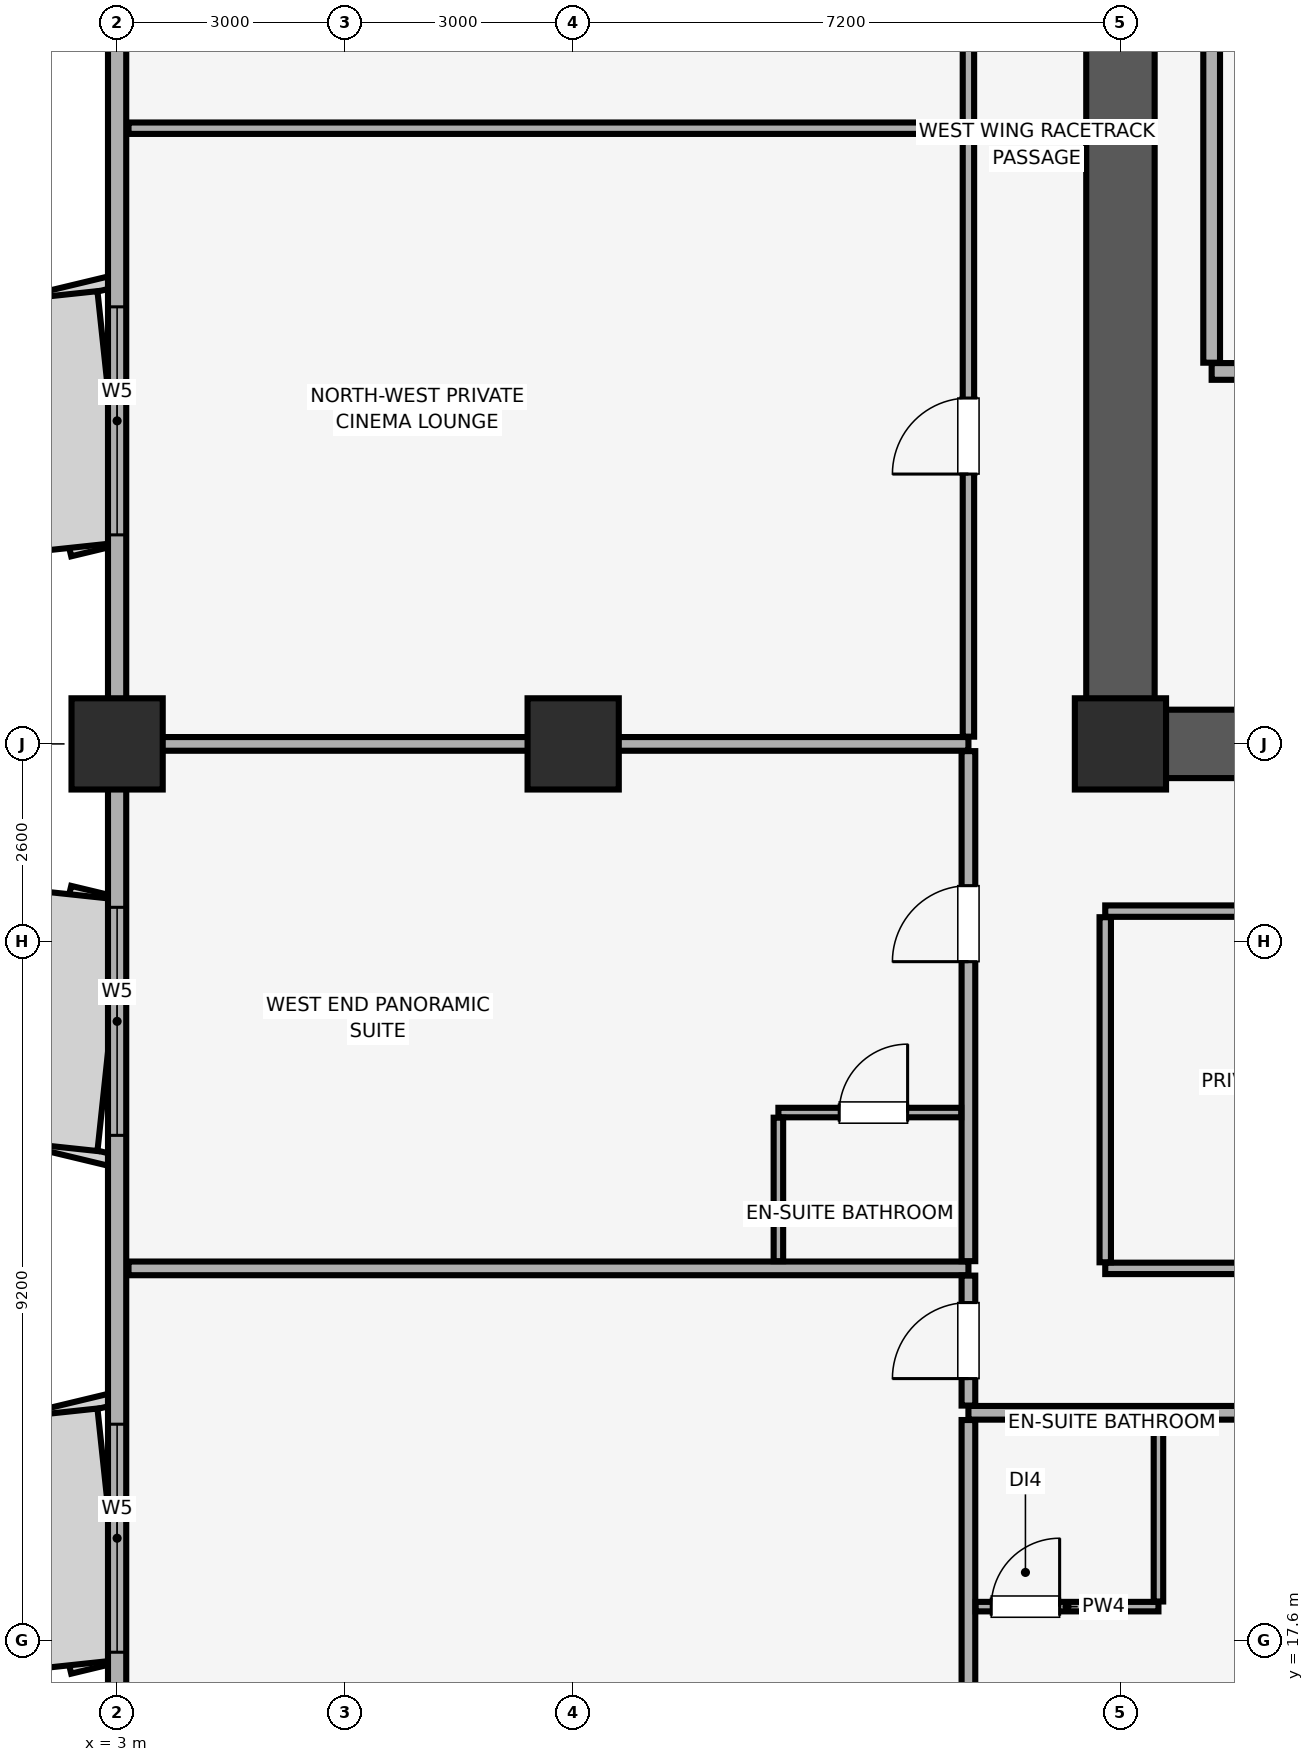
"""IFC4 building model, lengths in metres.
Left out: names, types, materials, properties, quantities, classifications, styles, units other than length and angle.
Written with IfcOpenShell. Run it as: python <this file> out.ifc"""

import sys

from ifc_helpers import new_model, si_unit, direction, frame, frame_2d, origin, origin_2d, place, context, subcontext, project, spatial, rectangle, extrude, element, fill, save


model = new_model("IFC4")
c1 = context("Model", 3, precision=1e-05, world=origin(), true_north=direction((0.0, 1.0)))
c2 = subcontext(c1, "Body", "Model", "MODEL_VIEW")
j1 = project(units=[si_unit("LENGTHUNIT", "METRE"), si_unit("PLANEANGLEUNIT", "RADIAN")], contexts=[c1])
p1 = place(None, origin())
s1 = spatial("IfcSite", under=j1, at=p1, CompositionType="ELEMENT")
p2 = place(p1, origin())
s2 = spatial("IfcBuilding", under=s1, at=p2, CompositionType="ELEMENT")
p3 = place(p2, frame((0.0, 0.0, 180.95)))
s3 = spatial("IfcBuildingStorey", under=s2, at=p3, CompositionType="ELEMENT", Elevation=180.95)
for number, where, z_axis, x_axis in (
    (1, (3.0, 29.4, 0.0), (0.0, 0.0, 1.0), (1.0, 0.0, 0.0)),
    (2, (9.0, 29.4, 0.0), (0.0, 0.0, 1.0), (1.0, 0.0, 0.0)),
    (3, (16.2, 29.4, 0.0), (0.0, 0.0, 1.0), (1.0, 0.0, 0.0)),
):
    element("IfcColumn", number, at=place(p3, frame(where, z_axis=z_axis, x_axis=x_axis)), inside=s3, PredefinedType="COLUMN", context=c2, shape_type="SweptSolid", body=[
        extrude(rectangle(XDim=1.2, YDim=1.2, at=origin_2d()), origin(), (0.0, 0.0, 1.0), 3.45),
    ])
p4 = place(p3, frame((3.0, 45.0, 0.0), z_axis=(0.0, 0.0, 1.0), x_axis=(0.0, -1.0, 0.0)))
e4 = element("IfcWall", 4, at=p4, inside=s3, PredefinedType="SOLIDWALL", context=c2, shape_type="SweptSolid", body=[
    extrude(rectangle(XDim=38.0, YDim=0.24, at=frame_2d((19.0, 0.0))), origin(), (0.0, 0.0, 1.0), 2.65),
])
p5 = place(p4, frame((32.5, 0.0, 0.85)))
e5 = element("IfcOpeningElement", 5, at=p5, cuts=e4, PredefinedType="OPENING", context=c2, shape_type="SweptSolid", body=[
    extrude(rectangle(XDim=3.0, YDim=1.5, at=frame_2d((1.5, 0.75))), frame((0.0, 0.13, 0.0), z_axis=(0.0, -1.0, 0.0), x_axis=(1.0, 0.0, 0.0)), (0.0, 0.0, 1.0), 0.26),
])
p6 = place(p4, frame((24.55, 0.0, 0.85)))
e6 = element("IfcOpeningElement", 6, at=p6, cuts=e4, PredefinedType="OPENING", context=c2, shape_type="SweptSolid", body=[
    extrude(rectangle(XDim=3.0, YDim=1.5, at=frame_2d((1.5, 0.75))), frame((0.0, 0.13, 0.0), z_axis=(0.0, -1.0, 0.0), x_axis=(1.0, 0.0, 0.0)), (0.0, 0.0, 1.0), 0.26),
])
p7 = place(p4, frame((17.75, 0.0, 0.85)))
e7 = element("IfcOpeningElement", 7, at=p7, cuts=e4, PredefinedType="OPENING", context=c2, shape_type="SweptSolid", body=[
    extrude(rectangle(XDim=3.0, YDim=1.5, at=frame_2d((1.5, 0.75))), frame((0.0, 0.13, 0.0), z_axis=(0.0, -1.0, 0.0), x_axis=(1.0, 0.0, 0.0)), (0.0, 0.0, 1.0), 0.26),
])
p8 = place(p4, frame((9.85, 0.0, 0.85)))
e8 = element("IfcOpeningElement", 8, at=p8, cuts=e4, PredefinedType="OPENING", context=c2, shape_type="SweptSolid", body=[
    extrude(rectangle(XDim=3.0, YDim=1.5, at=frame_2d((1.5, 0.75))), frame((0.0, 0.13, 0.0), z_axis=(0.0, -1.0, 0.0), x_axis=(1.0, 0.0, 0.0)), (0.0, 0.0, 1.0), 0.26),
])
p9 = place(p4, frame((1.085, 0.0, 0.85)))
e9 = element("IfcOpeningElement", 9, at=p9, cuts=e4, PredefinedType="OPENING", context=c2, shape_type="SweptSolid", body=[
    extrude(rectangle(XDim=3.0, YDim=1.5, at=frame_2d((1.5, 0.75))), frame((0.0, 0.13, 0.0), z_axis=(0.0, -1.0, 0.0), x_axis=(1.0, 0.0, 0.0)), (0.0, 0.0, 1.0), 0.26),
])
p10 = place(p3, frame((16.2, 29.4, 0.0), z_axis=(0.0, 0.0, 1.0), x_axis=(0.0, 1.0, 0.0)))
e10 = element("IfcWall", 10, at=p10, inside=s3, PredefinedType="SHEAR", context=c2, shape_type="SweptSolid", body=[
    extrude(rectangle(XDim=19.2, YDim=0.9, at=frame_2d((9.6, 0.0))), origin(), (0.0, 0.0, 1.0), 3.45),
])
p11 = place(p3, frame((16.655, 29.4, 0.0), z_axis=(0.0, 0.0, 1.0), x_axis=(1.0, 0.0, 0.0)))
e11 = element("IfcWall", 11, at=p11, inside=s3, PredefinedType="SHEAR", context=c2, shape_type="SweptSolid", body=[
    extrude(rectangle(XDim=6.945, YDim=0.9, at=frame_2d((3.473, 0.0))), origin(), (0.0, 0.0, 1.0), 3.45),
])
p12 = place(p3, frame((17.4, 34.3, 0.0), z_axis=(0.0, 0.0, 1.0), x_axis=(1.0, 0.0, 0.0)))
e12 = element("IfcWall", 12, at=p12, inside=s3, PredefinedType="PARTITIONING", context=c2, shape_type="SweptSolid", body=[
    extrude(rectangle(XDim=6.05, YDim=0.22, at=frame_2d((3.025, 0.0))), origin(), (0.0, 0.0, 1.0), 3.45),
])
p13 = place(p12, frame((2.2, 0.0, 0.0)))
e13 = element("IfcOpeningElement", 13, at=p13, cuts=e12, PredefinedType="OPENING", context=c2, shape_type="SweptSolid", body=[
    extrude(rectangle(XDim=1.2, YDim=2.15, at=frame_2d((0.6, 1.075))), frame((0.0, 0.12, 0.0), z_axis=(0.0, -1.0, 0.0), x_axis=(1.0, 0.0, 0.0)), (0.0, 0.0, 1.0), 0.24),
])
p14 = place(p3, frame((17.4, 34.415, 0.0), z_axis=(0.0, 0.0, 1.0), x_axis=(0.0, 1.0, 0.0)))
e14 = element("IfcWall", 14, at=p14, inside=s3, PredefinedType="PARTITIONING", context=c2, shape_type="SweptSolid", body=[
    extrude(rectangle(XDim=5.43, YDim=0.22, at=frame_2d((2.715, 0.0))), origin(), (0.0, 0.0, 1.0), 3.45),
])
p15 = place(p3, frame((14.2, 20.6, 0.0), z_axis=(0.0, 0.0, 1.0), x_axis=(1.0, 0.0, 0.0)))
e15 = element("IfcWall", 15, at=p15, inside=s3, PredefinedType="PARTITIONING", context=c2, shape_type="SweptSolid", body=[
    extrude(rectangle(XDim=7.912, YDim=0.18, at=frame_2d((3.956, 0.0))), origin(), (0.0, 0.0, 1.0), 3.45),
])
p16 = place(p15, frame((5.156, 0.0, 0.0)))
e16 = element("IfcOpeningElement", 16, at=p16, cuts=e15, PredefinedType="OPENING", context=c2, shape_type="SweptSolid", body=[
    extrude(rectangle(XDim=1.0, YDim=2.15, at=frame_2d((0.5, 1.075))), frame((0.0, 0.1, 0.0), z_axis=(0.0, -1.0, 0.0), x_axis=(1.0, 0.0, 0.0)), (0.0, 0.0, 1.0), 0.2),
])
p17 = place(p3, frame((14.2, 3.15, 0.0), z_axis=(0.0, 0.0, 1.0), x_axis=(0.0, 1.0, 0.0)))
e17 = element("IfcWall", 17, at=p17, inside=s3, PredefinedType="PARTITIONING", context=c2, shape_type="SweptSolid", body=[
    extrude(rectangle(XDim=17.355, YDim=0.18, at=frame_2d((8.677, 0.0))), origin(), (0.0, 0.0, 1.0), 3.45),
])
p18 = place(p3, frame((14.295, 18.05, 0.0), z_axis=(0.0, 0.0, 1.0), x_axis=(1.0, 0.0, 0.0)))
e18 = element("IfcWall", 18, at=p18, inside=s3, PredefinedType="PARTITIONING", context=c2, shape_type="SweptSolid", body=[
    extrude(rectangle(XDim=2.405, YDim=0.125, at=frame_2d((1.203, 0.0))), origin(), (0.0, 0.0, 1.0), 3.45),
])
p19 = place(p18, frame((0.205, 0.0, 0.0)))
e19 = element("IfcOpeningElement", 19, at=p19, cuts=e18, PredefinedType="OPENING", context=c2, shape_type="SweptSolid", body=[
    extrude(rectangle(XDim=0.9, YDim=2.1, at=frame_2d((0.45, 1.05))), frame((0.0, 0.073, 0.0), z_axis=(0.0, -1.0, 0.0), x_axis=(1.0, 0.0, 0.0)), (0.0, 0.0, 1.0), 0.145),
])
p20 = place(p3, frame((16.7, 18.117, 0.0), z_axis=(0.0, 0.0, 1.0), x_axis=(0.0, 1.0, 0.0)))
e20 = element("IfcWall", 20, at=p20, inside=s3, PredefinedType="PARTITIONING", context=c2, shape_type="SweptSolid", body=[
    extrude(rectangle(XDim=2.387, YDim=0.125, at=frame_2d((1.194, 0.0))), origin(), (0.0, 0.0, 1.0), 3.45),
])
p21 = place(p3, frame((3.15, 22.5, 0.0), z_axis=(0.0, 0.0, 1.0), x_axis=(1.0, 0.0, 0.0)))
e21 = element("IfcWall", 21, at=p21, inside=s3, PredefinedType="PARTITIONING", context=c2, shape_type="SweptSolid", body=[
    extrude(rectangle(XDim=11.05, YDim=0.18, at=frame_2d((5.525, 0.0))), origin(), (0.0, 0.0, 1.0), 3.45),
])
p22 = place(p3, frame((14.2, 20.695, 0.0), z_axis=(0.0, 0.0, 1.0), x_axis=(0.0, 1.0, 0.0)))
e22 = element("IfcWall", 22, at=p22, inside=s3, PredefinedType="PARTITIONING", context=c2, shape_type="SweptSolid", body=[
    extrude(rectangle(XDim=1.71, YDim=0.18, at=frame_2d((0.855, 0.0))), origin(), (0.0, 0.0, 1.0), 3.45),
])
p23 = place(p22, frame((0.355, 0.0, 0.0)))
e23 = element("IfcOpeningElement", 23, at=p23, cuts=e22, PredefinedType="OPENING", context=c2, shape_type="SweptSolid", body=[
    extrude(rectangle(XDim=1.0, YDim=2.15, at=frame_2d((0.5, 1.075))), frame((0.0, 0.1, 0.0), z_axis=(0.0, -1.0, 0.0), x_axis=(1.0, 0.0, 0.0)), (0.0, 0.0, 1.0), 0.2),
])
p24 = place(p3, frame((3.15, 29.4, 0.0), z_axis=(0.0, 0.0, 1.0), x_axis=(1.0, 0.0, 0.0)))
e24 = element("IfcWall", 24, at=p24, inside=s3, PredefinedType="PARTITIONING", context=c2, shape_type="SweptSolid", body=[
    extrude(rectangle(XDim=11.05, YDim=0.18, at=frame_2d((5.525, 0.0))), origin(), (0.0, 0.0, 1.0), 2.54),
])
p25 = place(p3, frame((14.2, 22.595, 0.0), z_axis=(0.0, 0.0, 1.0), x_axis=(0.0, 1.0, 0.0)))
e25 = element("IfcWall", 25, at=p25, inside=s3, PredefinedType="PARTITIONING", context=c2, shape_type="SweptSolid", body=[
    extrude(rectangle(XDim=6.71, YDim=0.18, at=frame_2d((3.355, 0.0))), origin(), (0.0, 0.0, 1.0), 3.45),
])
p26 = place(p25, frame((3.94, 0.0, 0.0)))
e26 = element("IfcOpeningElement", 26, at=p26, cuts=e25, PredefinedType="OPENING", context=c2, shape_type="SweptSolid", body=[
    extrude(rectangle(XDim=1.0, YDim=2.15, at=frame_2d((0.5, 1.075))), frame((0.0, 0.1, 0.0), z_axis=(0.0, -1.0, 0.0), x_axis=(1.0, 0.0, 0.0)), (0.0, 0.0, 1.0), 0.2),
])
p27 = place(p3, frame((11.7, 24.55, 0.0), z_axis=(0.0, 0.0, 1.0), x_axis=(1.0, 0.0, 0.0)))
e27 = element("IfcWall", 27, at=p27, inside=s3, PredefinedType="PARTITIONING", context=c2, shape_type="SweptSolid", body=[
    extrude(rectangle(XDim=2.405, YDim=0.125, at=frame_2d((1.203, 0.0))), origin(), (0.0, 0.0, 1.0), 3.45),
])
p28 = place(p27, frame((0.8, 0.0, 0.0)))
e28 = element("IfcOpeningElement", 28, at=p28, cuts=e27, PredefinedType="OPENING", context=c2, shape_type="SweptSolid", body=[
    extrude(rectangle(XDim=0.9, YDim=2.1, at=frame_2d((0.45, 1.05))), frame((0.0, 0.073, 0.0), z_axis=(0.0, -1.0, 0.0), x_axis=(1.0, 0.0, 0.0)), (0.0, 0.0, 1.0), 0.145),
])
p29 = place(p3, frame((11.7, 22.595, 0.0), z_axis=(0.0, 0.0, 1.0), x_axis=(0.0, 1.0, 0.0)))
e29 = element("IfcWall", 29, at=p29, inside=s3, PredefinedType="PARTITIONING", context=c2, shape_type="SweptSolid", body=[
    extrude(rectangle(XDim=1.887, YDim=0.125, at=frame_2d((0.944, 0.0))), origin(), (0.0, 0.0, 1.0), 3.45),
])
p30 = place(p3, frame((16.0, 22.5, 0.0), z_axis=(0.0, 0.0, 1.0), x_axis=(1.0, 0.0, 0.0)))
e30 = element("IfcWall", 30, at=p30, inside=s3, PredefinedType="PARTITIONING", context=c2, shape_type="SweptSolid", body=[
    extrude(rectangle(XDim=9.0, YDim=0.15, at=frame_2d((4.5, 0.0))), origin(), (0.0, 0.0, 1.0), 3.45),
])
p31 = place(p3, frame((16.0, 27.2, 0.0), z_axis=(0.0, 0.0, 1.0), x_axis=(1.0, 0.0, 0.0)))
e31 = element("IfcWall", 31, at=p31, inside=s3, PredefinedType="PARTITIONING", context=c2, shape_type="SweptSolid", body=[
    extrude(rectangle(XDim=9.0, YDim=0.15, at=frame_2d((4.5, 0.0))), origin(), (0.0, 0.0, 1.0), 3.45),
])
p32 = place(p31, frame((4.0, 0.0, 0.0)))
e32 = element("IfcOpeningElement", 32, at=p32, cuts=e31, PredefinedType="OPENING", context=c2, shape_type="SweptSolid", body=[
    extrude(rectangle(XDim=1.0, YDim=2.15, at=frame_2d((0.5, 1.075))), frame((0.0, 0.085, 0.0), z_axis=(0.0, -1.0, 0.0), x_axis=(1.0, 0.0, 0.0)), (0.0, 0.0, 1.0), 0.17),
])
p33 = place(p3, frame((16.0, 22.58, 0.0), z_axis=(0.0, 0.0, 1.0), x_axis=(0.0, 1.0, 0.0)))
e33 = element("IfcWall", 33, at=p33, inside=s3, PredefinedType="PARTITIONING", context=c2, shape_type="SweptSolid", body=[
    extrude(rectangle(XDim=4.54, YDim=0.15, at=frame_2d((2.27, 0.0))), origin(), (0.0, 0.0, 1.0), 2.95),
])
p34 = place(p3, frame((3.15, 37.5, 0.0), z_axis=(0.0, 0.0, 1.0), x_axis=(1.0, 0.0, 0.0)))
e34 = element("IfcWall", 34, at=p34, inside=s3, PredefinedType="PARTITIONING", context=c2, shape_type="SweptSolid", body=[
    extrude(rectangle(XDim=11.05, YDim=0.15, at=frame_2d((5.525, 0.0))), origin(), (0.0, 0.0, 1.0), 3.45),
])
p35 = place(p3, frame((14.2, 29.495, 0.0), z_axis=(0.0, 0.0, 1.0), x_axis=(0.0, 1.0, 0.0)))
e35 = element("IfcWall", 35, at=p35, inside=s3, PredefinedType="PARTITIONING", context=c2, shape_type="SweptSolid", body=[
    extrude(rectangle(XDim=7.925, YDim=0.15, at=frame_2d((3.962, 0.0))), origin(), (0.0, 0.0, 1.0), 3.45),
])
p36 = place(p35, frame((3.455, 0.0, 0.0)))
e36 = element("IfcOpeningElement", 36, at=p36, cuts=e35, PredefinedType="OPENING", context=c2, shape_type="SweptSolid", body=[
    extrude(rectangle(XDim=1.0, YDim=2.15, at=frame_2d((0.5, 1.075))), frame((0.0, 0.085, 0.0), z_axis=(0.0, -1.0, 0.0), x_axis=(1.0, 0.0, 0.0)), (0.0, 0.0, 1.0), 0.17),
])
p37 = place(p3, frame((14.2, 37.58, 0.0), z_axis=(0.0, 0.0, 1.0), x_axis=(0.0, 1.0, 0.0)))
e37 = element("IfcWall", 37, at=p37, inside=s3, PredefinedType="PARTITIONING", context=c2, shape_type="SweptSolid", body=[
    extrude(rectangle(XDim=11.27, YDim=0.15, at=frame_2d((5.635, 0.0))), origin(), (0.0, 0.0, 1.0), 3.45),
])
p38 = place(p37, frame((3.02, 0.0, 0.0)))
e38 = element("IfcOpeningElement", 38, at=p38, cuts=e37, PredefinedType="OPENING", context=c2, shape_type="SweptSolid", body=[
    extrude(rectangle(XDim=1.0, YDim=2.15, at=frame_2d((0.5, 1.075))), frame((0.0, 0.085, 0.0), z_axis=(0.0, -1.0, 0.0), x_axis=(1.0, 0.0, 0.0)), (0.0, 0.0, 1.0), 0.17),
])
p39 = place(p6, origin())
e39 = element("IfcWindow", 39, at=p39, inside=s3, PartitioningType="SINGLE_PANEL", PredefinedType="WINDOW", context=c2, shape_type="SweptSolid", body=[
    extrude(rectangle(XDim=3.0, YDim=1.5, at=frame_2d((1.5, 0.75))), frame((0.0, 0.03, 0.0), z_axis=(0.0, -1.0, 0.0), x_axis=(1.0, 0.0, 0.0)), (0.0, 0.0, 1.0), 0.06),
])
fill(e6, e39)
p40 = place(p7, origin())
e40 = element("IfcWindow", 40, at=p40, inside=s3, PartitioningType="SINGLE_PANEL", PredefinedType="WINDOW", context=c2, shape_type="SweptSolid", body=[
    extrude(rectangle(XDim=3.0, YDim=1.5, at=frame_2d((1.5, 0.75))), frame((0.0, 0.03, 0.0), z_axis=(0.0, -1.0, 0.0), x_axis=(1.0, 0.0, 0.0)), (0.0, 0.0, 1.0), 0.06),
])
fill(e7, e40)
p41 = place(p8, origin())
e41 = element("IfcWindow", 41, at=p41, inside=s3, PartitioningType="SINGLE_PANEL", PredefinedType="WINDOW", context=c2, shape_type="SweptSolid", body=[
    extrude(rectangle(XDim=3.0, YDim=1.5, at=frame_2d((1.5, 0.75))), frame((0.0, 0.03, 0.0), z_axis=(0.0, -1.0, 0.0), x_axis=(1.0, 0.0, 0.0)), (0.0, 0.0, 1.0), 0.06),
])
fill(e8, e41)
p42 = place(p19, origin())
e42 = element("IfcDoor", 42, at=p42, inside=s3, OperationType="SINGLE_SWING_RIGHT", PredefinedType="DOOR", context=c2, shape_type="SweptSolid", body=[
    extrude(rectangle(XDim=0.9, YDim=2.1, at=frame_2d((0.45, 1.05))), frame((0.0, 0.025, 0.0), z_axis=(0.0, -1.0, 0.0), x_axis=(1.0, 0.0, 0.0)), (0.0, 0.0, 1.0), 0.05),
])
fill(e19, e42)
p43 = place(p23, origin())
e43 = element("IfcDoor", 43, at=p43, inside=s3, OperationType="SINGLE_SWING_LEFT", PredefinedType="DOOR", context=c2, shape_type="SweptSolid", body=[
    extrude(rectangle(XDim=1.0, YDim=2.15, at=frame_2d((0.5, 1.075))), frame((0.0, 0.025, 0.0), z_axis=(0.0, -1.0, 0.0), x_axis=(1.0, 0.0, 0.0)), (0.0, 0.0, 1.0), 0.05),
])
fill(e23, e43)
p44 = place(p26, origin())
e44 = element("IfcDoor", 44, at=p44, inside=s3, OperationType="SINGLE_SWING_LEFT", PredefinedType="DOOR", context=c2, shape_type="SweptSolid", body=[
    extrude(rectangle(XDim=1.0, YDim=2.15, at=frame_2d((0.5, 1.075))), frame((0.0, 0.025, 0.0), z_axis=(0.0, -1.0, 0.0), x_axis=(1.0, 0.0, 0.0)), (0.0, 0.0, 1.0), 0.05),
])
fill(e26, e44)
p45 = place(p28, origin())
e45 = element("IfcDoor", 45, at=p45, inside=s3, OperationType="SINGLE_SWING_RIGHT", PredefinedType="DOOR", context=c2, shape_type="SweptSolid", body=[
    extrude(rectangle(XDim=0.9, YDim=2.1, at=frame_2d((0.45, 1.05))), frame((0.0, 0.025, 0.0), z_axis=(0.0, -1.0, 0.0), x_axis=(1.0, 0.0, 0.0)), (0.0, 0.0, 1.0), 0.05),
])
fill(e28, e45)
p46 = place(p36, origin())
e46 = element("IfcDoor", 46, at=p46, inside=s3, OperationType="SINGLE_SWING_LEFT", PredefinedType="DOOR", context=c2, shape_type="SweptSolid", body=[
    extrude(rectangle(XDim=1.0, YDim=2.15, at=frame_2d((0.5, 1.075))), frame((0.0, 0.025, 0.0), z_axis=(0.0, -1.0, 0.0), x_axis=(1.0, 0.0, 0.0)), (0.0, 0.0, 1.0), 0.05),
])
fill(e36, e46)
save(model, sys.argv[1])
